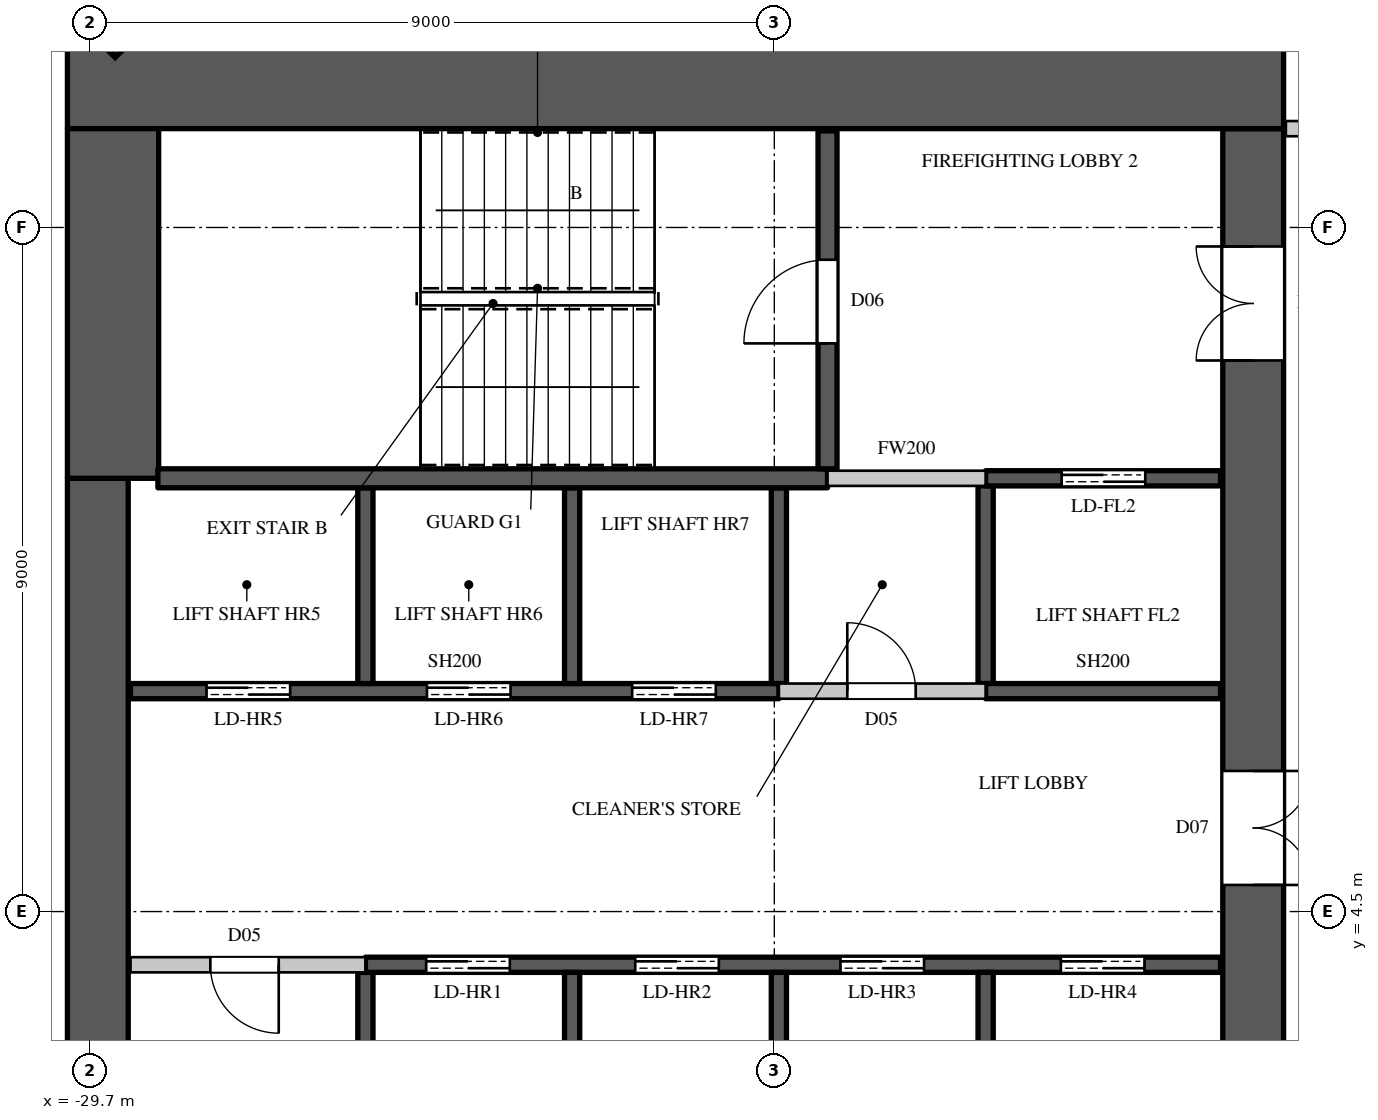
"""IFC4 building model, lengths in metres.
Left out: names, types, materials, properties, quantities, classifications, styles, units other than length and angle.
Written with IfcOpenShell. Run it as: python <this file> out.ifc"""

import sys

from ifc_helpers import new_model, si_unit, direction, frame, frame_2d, origin, origin_2d, place, context, subcontext, project, spatial, rectangle, extrude, element, fill, save


model = new_model("IFC4")
c1 = context("Model", 3, precision=1e-05, world=origin(), true_north=direction((0.0, 1.0)))
c2 = subcontext(c1, "Body", "Model", "MODEL_VIEW")
j1 = project(units=[si_unit("LENGTHUNIT", "METRE"), si_unit("PLANEANGLEUNIT", "RADIAN")], contexts=[c1])
p1 = place(None, origin())
s1 = spatial("IfcSite", under=j1, at=p1, CompositionType="ELEMENT")
p2 = place(p1, origin())
s2 = spatial("IfcBuilding", under=s1, at=p2, CompositionType="ELEMENT")
p3 = place(p2, frame((0.0, 0.0, 189.2)))
s3 = spatial("IfcBuildingStorey", under=s2, at=p3, CompositionType="ELEMENT", Elevation=189.2)
p4 = place(p3, frame((-29.443, 16.443, 0.0), z_axis=(0.0, 0.0, 1.0), x_axis=(-0.707106781187, -0.707106781187, 0.0)))
e1 = element("IfcColumn", 1, at=p4, inside=s3, PredefinedType="COLUMN", context=c2, shape_type="SweptSolid", body=[
    extrude(rectangle(XDim=0.9, YDim=1.1, at=origin_2d()), origin(), (0.0, 0.0, 1.0), 4.1),
])
p5 = place(p3, frame((-30.0, 15.4, 0.0), z_axis=(0.0, 0.0, 1.0), x_axis=(1.0, 0.0, 0.0)))
e2 = element("IfcWall", 2, at=p5, inside=s3, PredefinedType="SHEAR", context=c2, shape_type="SweptSolid", body=[
    extrude(rectangle(XDim=16.0, YDim=1.2, at=frame_2d((8.0, 0.0))), origin(), (0.0, 0.0, 1.0), 4.1),
])
p6 = place(p3, frame((-14.4, -14.8, 0.0), z_axis=(0.0, 0.0, 1.0), x_axis=(0.0, 1.0, 0.0)))
e3 = element("IfcWall", 3, at=p6, inside=s3, PredefinedType="SHEAR", context=c2, shape_type="SweptSolid", body=[
    extrude(rectangle(XDim=29.6, YDim=0.8, at=frame_2d((14.8, 0.0))), origin(), (0.0, 0.0, 1.0), 4.1),
])
p7 = place(p6, frame((1.55, 0.0, 0.0)))
e4 = element("IfcOpeningElement", 4, at=p7, cuts=e3, PredefinedType="OPENING", context=c2, shape_type="SweptSolid", body=[
    extrude(rectangle(XDim=1.5, YDim=2.4, at=frame_2d((0.75, 1.2))), frame((0.0, 0.41, 0.0), z_axis=(0.0, -1.0, 0.0), x_axis=(1.0, 0.0, 0.0)), (0.0, 0.0, 1.0), 0.82),
])
p8 = place(p6, frame((26.55, 0.0, 0.0)))
e5 = element("IfcOpeningElement", 5, at=p8, cuts=e3, PredefinedType="OPENING", context=c2, shape_type="SweptSolid", body=[
    extrude(rectangle(XDim=1.5, YDim=2.4, at=frame_2d((0.75, 1.2))), frame((0.0, 0.41, 0.0), z_axis=(0.0, -1.0, 0.0), x_axis=(1.0, 0.0, 0.0)), (0.0, 0.0, 1.0), 0.82),
])
p9 = place(p6, frame((8.45, 0.0, 0.0)))
e6 = element("IfcOpeningElement", 6, at=p9, cuts=e3, PredefinedType="OPENING", context=c2, shape_type="SweptSolid", body=[
    extrude(rectangle(XDim=1.5, YDim=2.4, at=frame_2d((0.75, 1.2))), frame((0.0, 0.41, 0.0), z_axis=(0.0, -1.0, 0.0), x_axis=(1.0, 0.0, 0.0)), (0.0, 0.0, 1.0), 0.82),
])
p10 = place(p6, frame((19.65, 0.0, 0.0)))
e7 = element("IfcOpeningElement", 7, at=p10, cuts=e3, PredefinedType="OPENING", context=c2, shape_type="SweptSolid", body=[
    extrude(rectangle(XDim=1.5, YDim=2.4, at=frame_2d((0.75, 1.2))), frame((0.0, 0.41, 0.0), z_axis=(0.0, -1.0, 0.0), x_axis=(1.0, 0.0, 0.0)), (0.0, 0.0, 1.0), 0.82),
])
p11 = place(p6, frame((14.5, 0.0, 0.0)))
e8 = element("IfcOpeningElement", 8, at=p11, cuts=e3, PredefinedType="OPENING", context=c2, shape_type="SweptSolid", body=[
    extrude(rectangle(XDim=0.6, YDim=2.0, at=frame_2d((0.3, 1.0))), frame((0.0, 0.41, 0.0), z_axis=(0.0, -1.0, 0.0), x_axis=(1.0, 0.0, 0.0)), (0.0, 0.0, 1.0), 0.82),
])
p12 = place(p3, frame((-29.6, -10.2, 0.0), z_axis=(0.0, 0.0, 1.0), x_axis=(0.0, 1.0, 0.0)))
e9 = element("IfcWall", 9, at=p12, inside=s3, PredefinedType="SHEAR", context=c2, shape_type="SweptSolid", body=[
    extrude(rectangle(XDim=20.4, YDim=0.8, at=frame_2d((10.2, 0.0))), origin(), (0.0, 0.0, 1.0), 4.1),
])
p13 = place(p3, frame((-29.4, 10.2, 0.0), z_axis=(0.0, 0.0, 1.0), x_axis=(0.0, 1.0, 0.0)))
e10 = element("IfcWall", 10, at=p13, inside=s3, PredefinedType="SHEAR", context=c2, shape_type="SweptSolid", body=[
    extrude(rectangle(XDim=4.6, YDim=1.2, at=frame_2d((2.3, 0.0))), origin(), (0.0, 0.0, 1.0), 4.1),
])
p14 = place(p3, frame((-29.17, 3.8, 0.0), z_axis=(0.0, 0.0, 1.0), x_axis=(1.0, 0.0, 0.0)))
e11 = element("IfcWall", 11, at=p14, inside=s3, PredefinedType="PARTITIONING", context=c2, shape_type="SweptSolid", body=[
    extrude(rectangle(XDim=3.09, YDim=0.2, at=frame_2d((1.545, 0.0))), origin(), (0.0, 0.0, 1.0), 3.8),
])
p15 = place(p14, frame((1.05, 0.0, 0.0)))
e12 = element("IfcOpeningElement", 12, at=p15, cuts=e11, PredefinedType="OPENING", context=c2, shape_type="SweptSolid", body=[
    extrude(rectangle(XDim=0.9, YDim=2.2, at=frame_2d((0.45, 1.1))), frame((0.0, 0.11, 0.0), z_axis=(0.0, -1.0, 0.0), x_axis=(1.0, 0.0, 0.0)), (0.0, 0.0, 1.0), 0.22),
])
p16 = place(p3, frame((-20.64, 7.4, 0.0), z_axis=(0.0, 0.0, 1.0), x_axis=(1.0, 0.0, 0.0)))
e13 = element("IfcWall", 13, at=p16, inside=s3, PredefinedType="PARTITIONING", context=c2, shape_type="SweptSolid", body=[
    extrude(rectangle(XDim=2.72, YDim=0.2, at=frame_2d((1.36, 0.0))), origin(), (0.0, 0.0, 1.0), 3.8),
])
p17 = place(p16, frame((0.9, 0.0, 0.0)))
e14 = element("IfcOpeningElement", 14, at=p17, cuts=e13, PredefinedType="OPENING", context=c2, shape_type="SweptSolid", body=[
    extrude(rectangle(XDim=0.9, YDim=2.2, at=frame_2d((0.45, 1.1))), frame((0.0, 0.11, 0.0), z_axis=(0.0, -1.0, 0.0), x_axis=(1.0, 0.0, 0.0)), (0.0, 0.0, 1.0), 0.22),
])
p18 = place(p3, frame((-20.0, 10.2, 0.0), z_axis=(0.0, 0.0, 1.0), x_axis=(1.0, 0.0, 0.0)))
e15 = element("IfcWall", 15, at=p18, inside=s3, PredefinedType="PARTITIONING", context=c2, shape_type="SweptSolid", body=[
    extrude(rectangle(XDim=2.08, YDim=0.2, at=frame_2d((1.04, 0.0))), origin(), (0.0, 0.0, 1.0), 3.8),
])
p19 = place(p3, frame((-13.97, 14.8, 0.0), z_axis=(0.0, 0.0, 1.0), x_axis=(1.0, 0.0, 0.0)))
e16 = element("IfcWall", 16, at=p19, inside=s3, PredefinedType="PARTITIONING", context=c2, shape_type="SweptSolid", body=[
    extrude(rectangle(XDim=2.87, YDim=0.2, at=frame_2d((1.435, 0.0))), origin(), (0.0, 0.0, 1.0), 3.8),
])
p20 = place(p3, frame((-29.17, 7.4, 0.0), z_axis=(0.0, 0.0, 1.0), x_axis=(1.0, 0.0, 0.0)))
e17 = element("IfcWall", 17, at=p20, inside=s3, PredefinedType="SHEAR", context=c2, shape_type="SweptSolid", body=[
    extrude(rectangle(XDim=8.53, YDim=0.2, at=frame_2d((4.265, 0.0))), origin(), (0.0, 0.0, 1.0), 3.8),
])
p21 = place(p20, frame((1.0, 0.0, 0.0)))
e18 = element("IfcOpeningElement", 18, at=p21, cuts=e17, PredefinedType="OPENING", context=c2, shape_type="SweptSolid", body=[
    extrude(rectangle(XDim=1.1, YDim=2.2, at=frame_2d((0.55, 1.1))), frame((0.0, 0.11, 0.0), z_axis=(0.0, -1.0, 0.0), x_axis=(1.0, 0.0, 0.0)), (0.0, 0.0, 1.0), 0.22),
])
p22 = place(p20, frame((3.9, 0.0, 0.0)))
e19 = element("IfcOpeningElement", 19, at=p22, cuts=e17, PredefinedType="OPENING", context=c2, shape_type="SweptSolid", body=[
    extrude(rectangle(XDim=1.1, YDim=2.2, at=frame_2d((0.55, 1.1))), frame((0.0, 0.11, 0.0), z_axis=(0.0, -1.0, 0.0), x_axis=(1.0, 0.0, 0.0)), (0.0, 0.0, 1.0), 0.22),
])
p23 = place(p20, frame((6.6, 0.0, 0.0)))
e20 = element("IfcOpeningElement", 20, at=p23, cuts=e17, PredefinedType="OPENING", context=c2, shape_type="SweptSolid", body=[
    extrude(rectangle(XDim=1.1, YDim=2.2, at=frame_2d((0.55, 1.1))), frame((0.0, 0.11, 0.0), z_axis=(0.0, -1.0, 0.0), x_axis=(1.0, 0.0, 0.0)), (0.0, 0.0, 1.0), 0.22),
])
p24 = place(p3, frame((-26.08, 1.1, 0.0), z_axis=(0.0, 0.0, 1.0), x_axis=(0.0, 1.0, 0.0)))
e21 = element("IfcWall", 21, at=p24, inside=s3, PredefinedType="SHEAR", context=c2, shape_type="SweptSolid", body=[
    extrude(rectangle(XDim=2.6, YDim=0.2, at=frame_2d((1.3, 0.0))), origin(), (0.0, 0.0, 1.0), 3.8),
])
p25 = place(p3, frame((-26.08, 3.8, 0.0), z_axis=(0.0, 0.0, 1.0), x_axis=(1.0, 0.0, 0.0)))
e22 = element("IfcWall", 22, at=p25, inside=s3, PredefinedType="SHEAR", context=c2, shape_type="SweptSolid", body=[
    extrude(rectangle(XDim=11.25, YDim=0.2, at=frame_2d((5.625, 0.0))), origin(), (0.0, 0.0, 1.0), 3.8),
])
p26 = place(p25, frame((0.8, 0.0, 0.0)))
e23 = element("IfcOpeningElement", 23, at=p26, cuts=e22, PredefinedType="OPENING", context=c2, shape_type="SweptSolid", body=[
    extrude(rectangle(XDim=1.1, YDim=2.2, at=frame_2d((0.55, 1.1))), frame((0.0, 0.11, 0.0), z_axis=(0.0, -1.0, 0.0), x_axis=(1.0, 0.0, 0.0)), (0.0, 0.0, 1.0), 0.22),
])
p27 = place(p25, frame((3.55, 0.0, 0.0)))
e24 = element("IfcOpeningElement", 24, at=p27, cuts=e22, PredefinedType="OPENING", context=c2, shape_type="SweptSolid", body=[
    extrude(rectangle(XDim=1.1, YDim=2.2, at=frame_2d((0.55, 1.1))), frame((0.0, 0.11, 0.0), z_axis=(0.0, -1.0, 0.0), x_axis=(1.0, 0.0, 0.0)), (0.0, 0.0, 1.0), 0.22),
])
p28 = place(p25, frame((6.25, 0.0, 0.0)))
e25 = element("IfcOpeningElement", 25, at=p28, cuts=e22, PredefinedType="OPENING", context=c2, shape_type="SweptSolid", body=[
    extrude(rectangle(XDim=1.1, YDim=2.2, at=frame_2d((0.55, 1.1))), frame((0.0, 0.11, 0.0), z_axis=(0.0, -1.0, 0.0), x_axis=(1.0, 0.0, 0.0)), (0.0, 0.0, 1.0), 0.22),
])
p29 = place(p25, frame((9.15, 0.0, 0.0)))
e26 = element("IfcOpeningElement", 26, at=p29, cuts=e22, PredefinedType="OPENING", context=c2, shape_type="SweptSolid", body=[
    extrude(rectangle(XDim=1.1, YDim=2.2, at=frame_2d((0.55, 1.1))), frame((0.0, 0.11, 0.0), z_axis=(0.0, -1.0, 0.0), x_axis=(1.0, 0.0, 0.0)), (0.0, 0.0, 1.0), 0.22),
])
p30 = place(p3, frame((-26.08, 7.5, 0.0), z_axis=(0.0, 0.0, 1.0), x_axis=(0.0, 1.0, 0.0)))
e27 = element("IfcWall", 27, at=p30, inside=s3, PredefinedType="SHEAR", context=c2, shape_type="SweptSolid", body=[
    extrude(rectangle(XDim=2.575, YDim=0.2, at=frame_2d((1.288, 0.0))), origin(), (0.0, 0.0, 1.0), 4.1),
])
p31 = place(p3, frame((-23.36, 1.1, 0.0), z_axis=(0.0, 0.0, 1.0), x_axis=(0.0, 1.0, 0.0)))
e28 = element("IfcWall", 28, at=p31, inside=s3, PredefinedType="SHEAR", context=c2, shape_type="SweptSolid", body=[
    extrude(rectangle(XDim=2.6, YDim=0.2, at=frame_2d((1.3, 0.0))), origin(), (0.0, 0.0, 1.0), 4.1),
])
p32 = place(p3, frame((-23.36, 7.5, 0.0), z_axis=(0.0, 0.0, 1.0), x_axis=(0.0, 1.0, 0.0)))
e29 = element("IfcWall", 29, at=p32, inside=s3, PredefinedType="SHEAR", context=c2, shape_type="SweptSolid", body=[
    extrude(rectangle(XDim=2.575, YDim=0.2, at=frame_2d((1.288, 0.0))), origin(), (0.0, 0.0, 1.0), 4.1),
])
p33 = place(p3, frame((-20.64, 1.1, 0.0), z_axis=(0.0, 0.0, 1.0), x_axis=(0.0, 1.0, 0.0)))
e30 = element("IfcWall", 30, at=p33, inside=s3, PredefinedType="SHEAR", context=c2, shape_type="SweptSolid", body=[
    extrude(rectangle(XDim=2.6, YDim=0.2, at=frame_2d((1.3, 0.0))), origin(), (0.0, 0.0, 1.0), 4.1),
])
p34 = place(p3, frame((-20.64, 7.5, 0.0), z_axis=(0.0, 0.0, 1.0), x_axis=(0.0, 1.0, 0.0)))
e31 = element("IfcWall", 31, at=p34, inside=s3, PredefinedType="SHEAR", context=c2, shape_type="SweptSolid", body=[
    extrude(rectangle(XDim=2.575, YDim=0.2, at=frame_2d((1.288, 0.0))), origin(), (0.0, 0.0, 1.0), 3.8),
])
p35 = place(p3, frame((-17.92, 1.1, 0.0), z_axis=(0.0, 0.0, 1.0), x_axis=(0.0, 1.0, 0.0)))
e32 = element("IfcWall", 32, at=p35, inside=s3, PredefinedType="SHEAR", context=c2, shape_type="SweptSolid", body=[
    extrude(rectangle(XDim=2.6, YDim=0.2, at=frame_2d((1.3, 0.0))), origin(), (0.0, 0.0, 1.0), 4.1),
])
p36 = place(p3, frame((-17.92, 7.5, 0.0), z_axis=(0.0, 0.0, 1.0), x_axis=(0.0, 1.0, 0.0)))
e33 = element("IfcWall", 33, at=p36, inside=s3, PredefinedType="SHEAR", context=c2, shape_type="SweptSolid", body=[
    extrude(rectangle(XDim=2.6, YDim=0.2, at=frame_2d((1.3, 0.0))), origin(), (0.0, 0.0, 1.0), 3.8),
])
p37 = place(p3, frame((-17.92, 7.4, 0.0), z_axis=(0.0, 0.0, 1.0), x_axis=(1.0, 0.0, 0.0)))
e34 = element("IfcWall", 34, at=p37, inside=s3, PredefinedType="SHEAR", context=c2, shape_type="SweptSolid", body=[
    extrude(rectangle(XDim=3.09, YDim=0.2, at=frame_2d((1.545, 0.0))), origin(), (0.0, 0.0, 1.0), 3.8),
])
p38 = place(p3, frame((-17.92, 10.2, 0.0), z_axis=(0.0, 0.0, 1.0), x_axis=(1.0, 0.0, 0.0)))
e35 = element("IfcWall", 35, at=p38, inside=s3, PredefinedType="SHEAR", context=c2, shape_type="SweptSolid", body=[
    extrude(rectangle(XDim=3.09, YDim=0.2, at=frame_2d((1.545, 0.0))), origin(), (0.0, 0.0, 1.0), 3.8),
])
p39 = place(p38, frame((1.0, 0.0, 0.0)))
e36 = element("IfcOpeningElement", 36, at=p39, cuts=e35, PredefinedType="OPENING", context=c2, shape_type="SweptSolid", body=[
    extrude(rectangle(XDim=1.1, YDim=2.2, at=frame_2d((0.55, 1.1))), frame((0.0, 0.11, 0.0), z_axis=(0.0, -1.0, 0.0), x_axis=(1.0, 0.0, 0.0)), (0.0, 0.0, 1.0), 0.22),
])
p40 = place(p3, frame((-28.81, 10.2, 0.0), z_axis=(0.0, 0.0, 1.0), x_axis=(1.0, 0.0, 0.0)))
e37 = element("IfcWall", 37, at=p40, inside=s3, PredefinedType="SHEAR", context=c2, shape_type="SweptSolid", body=[
    extrude(rectangle(XDim=8.81, YDim=0.25, at=frame_2d((4.405, 0.0))), origin(), (0.0, 0.0, 1.0), 3.8),
])
p41 = place(p3, frame((-20.0, 10.325, 0.0), z_axis=(0.0, 0.0, 1.0), x_axis=(0.0, 1.0, 0.0)))
e38 = element("IfcWall", 38, at=p41, inside=s3, PredefinedType="SHEAR", context=c2, shape_type="SweptSolid", body=[
    extrude(rectangle(XDim=4.445, YDim=0.25, at=frame_2d((2.223, 0.0))), origin(), (0.0, 0.0, 1.0), 3.8),
])
p42 = place(p41, frame((1.65, 0.0, 0.0)))
e39 = element("IfcOpeningElement", 39, at=p42, cuts=e38, PredefinedType="OPENING", context=c2, shape_type="SweptSolid", body=[
    extrude(rectangle(XDim=1.1, YDim=2.2, at=frame_2d((0.55, 1.1))), frame((0.0, 0.135, 0.0), z_axis=(0.0, -1.0, 0.0), x_axis=(1.0, 0.0, 0.0)), (0.0, 0.0, 1.0), 0.27),
])
p43 = place(p42, origin())
e40 = element("IfcDoor", 40, at=p43, inside=s3, OperationType="SINGLE_SWING_LEFT", PredefinedType="DOOR", context=c2, shape_type="SweptSolid", body=[
    extrude(rectangle(XDim=1.1, YDim=2.2, at=frame_2d((0.55, 1.1))), frame((0.0, 0.025, 0.0), z_axis=(0.0, -1.0, 0.0), x_axis=(1.0, 0.0, 0.0)), (0.0, 0.0, 1.0), 0.05),
])
fill(e39, e40)
p44 = place(p15, origin())
e41 = element("IfcDoor", 41, at=p44, inside=s3, OperationType="SINGLE_SWING_LEFT", PredefinedType="DOOR", context=c2, shape_type="SweptSolid", body=[
    extrude(rectangle(XDim=0.9, YDim=2.2, at=frame_2d((0.45, 1.1))), frame((0.0, 0.025, 0.0), z_axis=(0.0, -1.0, 0.0), x_axis=(1.0, 0.0, 0.0)), (0.0, 0.0, 1.0), 0.05),
])
fill(e12, e41)
p45 = place(p17, origin())
e42 = element("IfcDoor", 42, at=p45, inside=s3, OperationType="SINGLE_SWING_LEFT", PredefinedType="DOOR", context=c2, shape_type="SweptSolid", body=[
    extrude(rectangle(XDim=0.9, YDim=2.2, at=frame_2d((0.45, 1.1))), frame((0.0, 0.025, 0.0), z_axis=(0.0, -1.0, 0.0), x_axis=(1.0, 0.0, 0.0)), (0.0, 0.0, 1.0), 0.05),
])
fill(e14, e42)
p46 = place(p26, origin())
e43 = element("IfcDoor", 43, at=p46, inside=s3, OperationType="DOUBLE_DOOR_SLIDING", PredefinedType="DOOR", context=c2, shape_type="SweptSolid", body=[
    extrude(rectangle(XDim=1.1, YDim=2.2, at=frame_2d((0.55, 1.1))), frame((0.0, 0.025, 0.0), z_axis=(0.0, -1.0, 0.0), x_axis=(1.0, 0.0, 0.0)), (0.0, 0.0, 1.0), 0.05),
])
fill(e23, e43)
p47 = place(p27, origin())
e44 = element("IfcDoor", 44, at=p47, inside=s3, OperationType="DOUBLE_DOOR_SLIDING", PredefinedType="DOOR", context=c2, shape_type="SweptSolid", body=[
    extrude(rectangle(XDim=1.1, YDim=2.2, at=frame_2d((0.55, 1.1))), frame((0.0, 0.025, 0.0), z_axis=(0.0, -1.0, 0.0), x_axis=(1.0, 0.0, 0.0)), (0.0, 0.0, 1.0), 0.05),
])
fill(e24, e44)
p48 = place(p28, origin())
e45 = element("IfcDoor", 45, at=p48, inside=s3, OperationType="DOUBLE_DOOR_SLIDING", PredefinedType="DOOR", context=c2, shape_type="SweptSolid", body=[
    extrude(rectangle(XDim=1.1, YDim=2.2, at=frame_2d((0.55, 1.1))), frame((0.0, 0.025, 0.0), z_axis=(0.0, -1.0, 0.0), x_axis=(1.0, 0.0, 0.0)), (0.0, 0.0, 1.0), 0.05),
])
fill(e25, e45)
p49 = place(p29, origin())
e46 = element("IfcDoor", 46, at=p49, inside=s3, OperationType="DOUBLE_DOOR_SLIDING", PredefinedType="DOOR", context=c2, shape_type="SweptSolid", body=[
    extrude(rectangle(XDim=1.1, YDim=2.2, at=frame_2d((0.55, 1.1))), frame((0.0, 0.025, 0.0), z_axis=(0.0, -1.0, 0.0), x_axis=(1.0, 0.0, 0.0)), (0.0, 0.0, 1.0), 0.05),
])
fill(e26, e46)
p50 = place(p21, origin())
e47 = element("IfcDoor", 47, at=p50, inside=s3, OperationType="DOUBLE_DOOR_SLIDING", PredefinedType="DOOR", context=c2, shape_type="SweptSolid", body=[
    extrude(rectangle(XDim=1.1, YDim=2.2, at=frame_2d((0.55, 1.1))), frame((0.0, 0.025, 0.0), z_axis=(0.0, -1.0, 0.0), x_axis=(1.0, 0.0, 0.0)), (0.0, 0.0, 1.0), 0.05),
])
fill(e18, e47)
p51 = place(p22, origin())
e48 = element("IfcDoor", 48, at=p51, inside=s3, OperationType="DOUBLE_DOOR_SLIDING", PredefinedType="DOOR", context=c2, shape_type="SweptSolid", body=[
    extrude(rectangle(XDim=1.1, YDim=2.2, at=frame_2d((0.55, 1.1))), frame((0.0, 0.025, 0.0), z_axis=(0.0, -1.0, 0.0), x_axis=(1.0, 0.0, 0.0)), (0.0, 0.0, 1.0), 0.05),
])
fill(e19, e48)
p52 = place(p23, origin())
e49 = element("IfcDoor", 49, at=p52, inside=s3, OperationType="DOUBLE_DOOR_SLIDING", PredefinedType="DOOR", context=c2, shape_type="SweptSolid", body=[
    extrude(rectangle(XDim=1.1, YDim=2.2, at=frame_2d((0.55, 1.1))), frame((0.0, 0.025, 0.0), z_axis=(0.0, -1.0, 0.0), x_axis=(1.0, 0.0, 0.0)), (0.0, 0.0, 1.0), 0.05),
])
fill(e20, e49)
p53 = place(p39, origin())
e50 = element("IfcDoor", 50, at=p53, inside=s3, OperationType="DOUBLE_DOOR_SLIDING", PredefinedType="DOOR", context=c2, shape_type="SweptSolid", body=[
    extrude(rectangle(XDim=1.1, YDim=2.2, at=frame_2d((0.55, 1.1))), frame((0.0, 0.025, 0.0), z_axis=(0.0, -1.0, 0.0), x_axis=(1.0, 0.0, 0.0)), (0.0, 0.0, 1.0), 0.05),
])
fill(e36, e50)
p54 = place(p8, origin())
e51 = element("IfcDoor", 51, at=p54, inside=s3, OperationType="DOUBLE_DOOR_SINGLE_SWING", PredefinedType="DOOR", context=c2, shape_type="SweptSolid", body=[
    extrude(rectangle(XDim=1.5, YDim=2.4, at=frame_2d((0.75, 1.2))), frame((0.0, 0.395, 0.0), z_axis=(0.0, -1.0, 0.0), x_axis=(1.0, 0.0, 0.0)), (0.0, 0.0, 1.0), 0.05),
])
fill(e5, e51)
p55 = place(p10, origin())
e52 = element("IfcDoor", 52, at=p55, inside=s3, OperationType="DOUBLE_DOOR_SINGLE_SWING", PredefinedType="DOOR", context=c2, shape_type="SweptSolid", body=[
    extrude(rectangle(XDim=1.5, YDim=2.4, at=frame_2d((0.75, 1.2))), frame((0.0, -0.345, 0.0), z_axis=(0.0, -1.0, 0.0), x_axis=(1.0, 0.0, 0.0)), (0.0, 0.0, 1.0), 0.05),
])
fill(e7, e52)
save(model, sys.argv[1])
